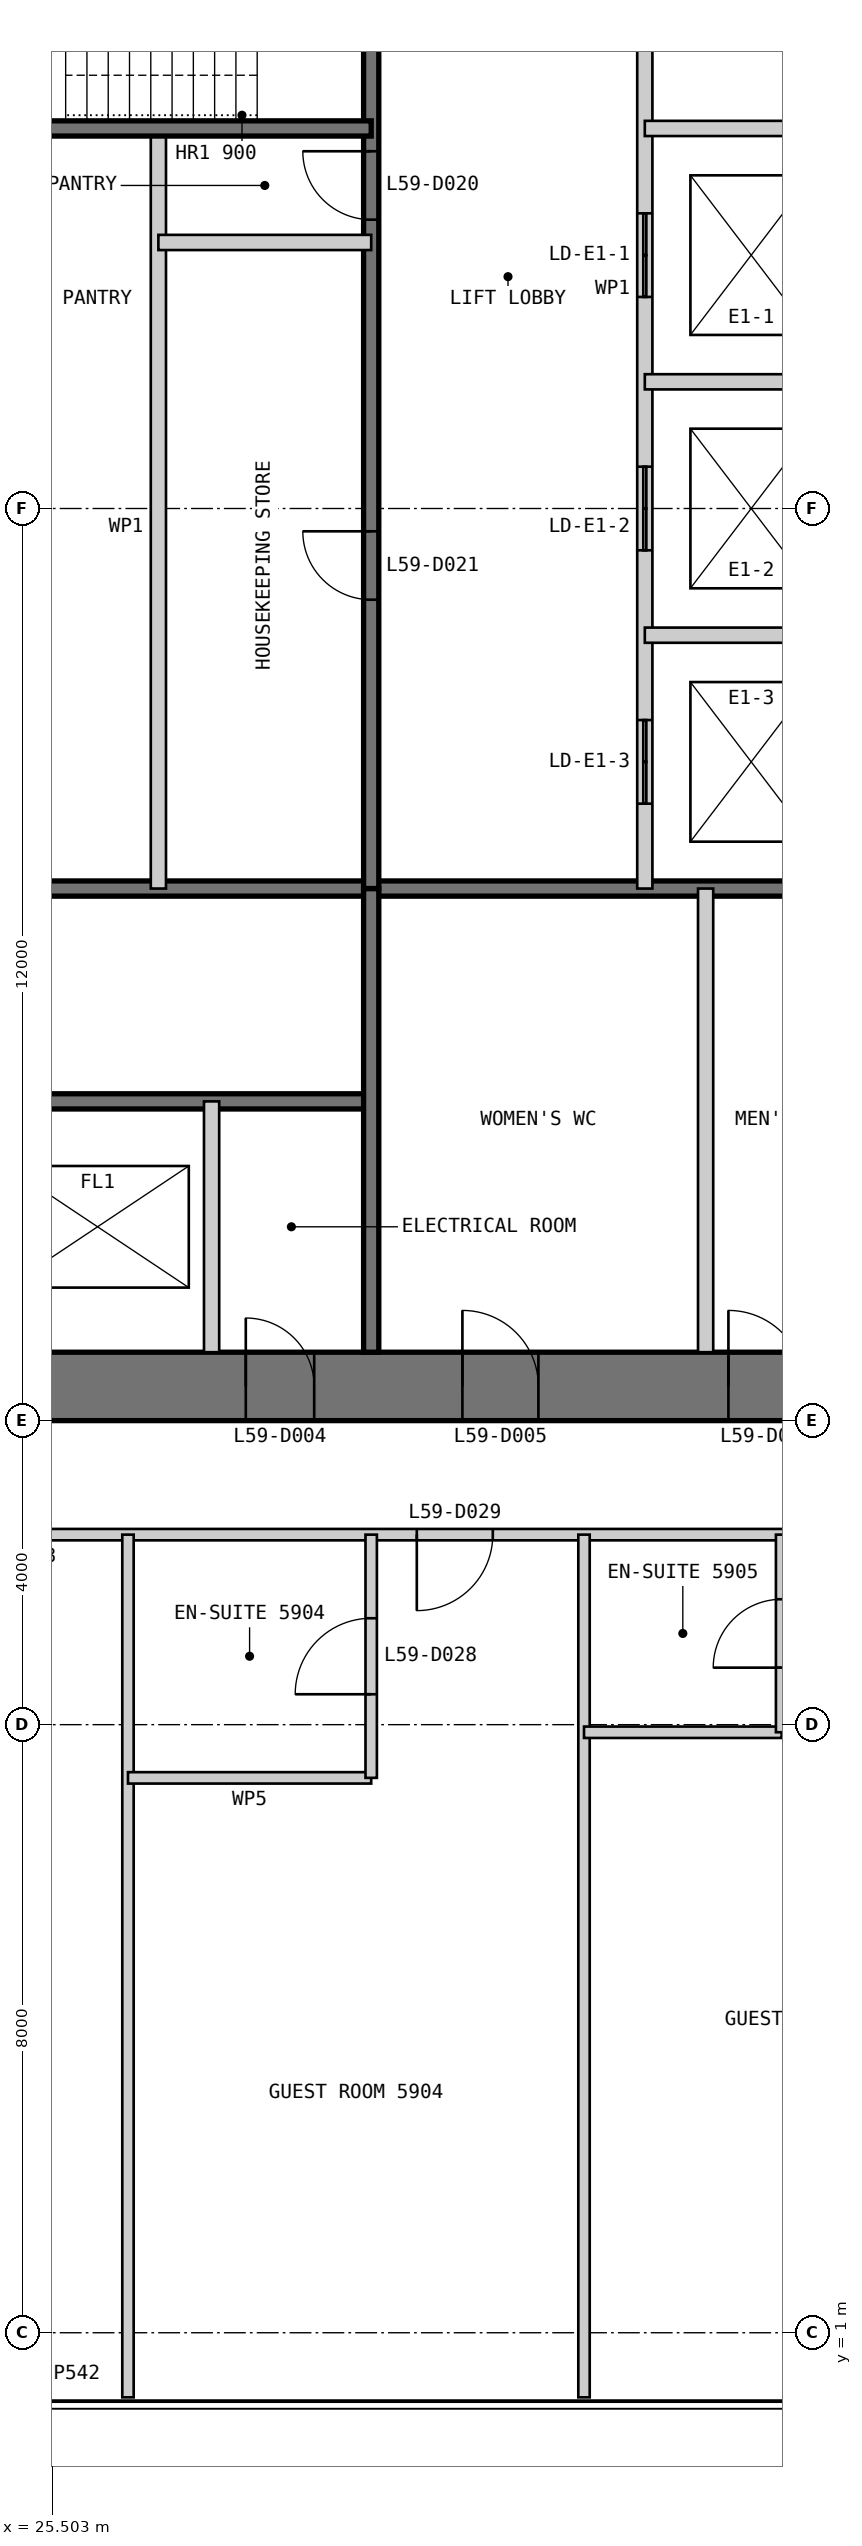
"""IFC4 building model, lengths in metres.
Left out: names, types, materials, properties, quantities, classifications, styles, units other than length and angle.
Written with IfcOpenShell. Run it as: python <this file> out.ifc"""

import sys

from ifc_helpers import new_model, si_unit, direction, frame, frame_2d, origin, place, context, subcontext, project, spatial, polyline, rectangle, outline, extrude, element, fill, save


model = new_model("IFC4")
c1 = context("Model", 3, precision=1e-05, world=origin(), true_north=direction((0.0, 1.0)))
c2 = subcontext(c1, "Body", "Model", "MODEL_VIEW")
j1 = project(units=[si_unit("LENGTHUNIT", "METRE"), si_unit("PLANEANGLEUNIT", "RADIAN")], contexts=[c1])
p1 = place(None, origin())
s1 = spatial("IfcSite", under=j1, at=p1, CompositionType="ELEMENT")
p2 = place(p1, origin())
s2 = spatial("IfcBuilding", under=s1, at=p2, CompositionType="ELEMENT")
p3 = place(p2, frame((0.0, 0.0, 252.6)))
s3 = spatial("IfcBuildingStorey", under=s2, at=p3, CompositionType="ELEMENT", Elevation=252.6)
p4 = place(p3, frame((13.0, 13.45, 0.0), z_axis=(0.0, 0.0, 1.0), x_axis=(1.0, 0.0, 0.0)))
e1 = element("IfcWall", 1, at=p4, inside=s3, PredefinedType="SHEAR", context=c2, shape_type="SweptSolid", body=[
    extrude(outline(polyline([(0.0, -0.45), (24.0, -0.45), (23.1, 0.45), (0.9, 0.45), (0.0, -0.45)])), origin(), (0.0, 0.0, 1.0), 3.4),
])
p5 = place(p4, frame((4.9, 0.0, 0.0)))
e2 = element("IfcOpeningElement", 2, at=p5, cuts=e1, PredefinedType="OPENING", context=c2, shape_type="SweptSolid", body=[
    extrude(rectangle(XDim=1.0, YDim=2.2, at=frame_2d((0.5, 1.1))), frame((0.0, 0.46, 0.0), z_axis=(0.0, -1.0, 0.0), x_axis=(1.0, 0.0, 0.0)), (0.0, 0.0, 1.0), 0.92),
])
p6 = place(p4, frame((8.9, 0.0, 0.0)))
e3 = element("IfcOpeningElement", 3, at=p6, cuts=e1, PredefinedType="OPENING", context=c2, shape_type="SweptSolid", body=[
    extrude(rectangle(XDim=1.1, YDim=2.2, at=frame_2d((0.55, 1.1))), frame((0.0, 0.46, 0.0), z_axis=(0.0, -1.0, 0.0), x_axis=(1.0, 0.0, 0.0)), (0.0, 0.0, 1.0), 0.92),
])
p7 = place(p4, frame((15.05, 0.0, 0.0)))
e4 = element("IfcOpeningElement", 4, at=p7, cuts=e1, PredefinedType="OPENING", context=c2, shape_type="SweptSolid", body=[
    extrude(rectangle(XDim=0.9, YDim=2.2, at=frame_2d((0.45, 1.1))), frame((0.0, 0.46, 0.0), z_axis=(0.0, -1.0, 0.0), x_axis=(1.0, 0.0, 0.0)), (0.0, 0.0, 1.0), 0.92),
])
p8 = place(p4, frame((17.9, 0.0, 0.0)))
e5 = element("IfcOpeningElement", 5, at=p8, cuts=e1, PredefinedType="OPENING", context=c2, shape_type="SweptSolid", body=[
    extrude(rectangle(XDim=1.0, YDim=2.2, at=frame_2d((0.5, 1.1))), frame((0.0, 0.46, 0.0), z_axis=(0.0, -1.0, 0.0), x_axis=(1.0, 0.0, 0.0)), (0.0, 0.0, 1.0), 0.92),
])
p9 = place(p4, frame((21.4, 0.0, 0.0)))
e6 = element("IfcOpeningElement", 6, at=p9, cuts=e1, PredefinedType="OPENING", context=c2, shape_type="SweptSolid", body=[
    extrude(rectangle(XDim=1.0, YDim=2.2, at=frame_2d((0.5, 1.1))), frame((0.0, 0.46, 0.0), z_axis=(0.0, -1.0, 0.0), x_axis=(1.0, 0.0, 0.0)), (0.0, 0.0, 1.0), 0.92),
])
p10 = place(p3, frame((20.3, 17.2, 0.0), z_axis=(0.0, 0.0, 1.0), x_axis=(1.0, 0.0, 0.0)))
e7 = element("IfcWall", 7, at=p10, inside=s3, PredefinedType="SOLIDWALL", context=c2, shape_type="SweptSolid", body=[
    extrude(rectangle(XDim=9.4, YDim=0.2, at=frame_2d((4.7, 0.0))), origin(), (0.0, 0.0, 1.0), 3.2),
])
p11 = place(p10, frame((0.25, 0.0, 0.0)))
e8 = element("IfcOpeningElement", 8, at=p11, cuts=e7, PredefinedType="OPENING", context=c2, shape_type="SweptSolid", body=[
    extrude(rectangle(XDim=1.0, YDim=2.2, at=frame_2d((0.5, 1.1))), frame((0.0, 0.11, 0.0), z_axis=(0.0, -1.0, 0.0), x_axis=(1.0, 0.0, 0.0)), (0.0, 0.0, 1.0), 0.22),
])
p12 = place(p3, frame((20.3, 20.0, 0.0), z_axis=(0.0, 0.0, 1.0), x_axis=(1.0, 0.0, 0.0)))
e9 = element("IfcWall", 9, at=p12, inside=s3, PredefinedType="SOLIDWALL", context=c2, shape_type="SweptSolid", body=[
    extrude(rectangle(XDim=15.8, YDim=0.2, at=frame_2d((7.9, 0.0))), origin(), (0.0, 0.0, 1.0), 3.2),
])
p13 = place(p3, frame((27.6, 13.9, 0.0), z_axis=(0.0, 0.0, 1.0), x_axis=(0.0, 1.0, 0.0)))
e10 = element("IfcWall", 10, at=p13, inside=s3, PredefinedType="PARTITIONING", context=c2, shape_type="SweptSolid", body=[
    extrude(rectangle(XDim=3.3, YDim=0.2, at=frame_2d((1.65, 0.0))), origin(), (0.0, 0.0, 1.0), 3.2),
])
p14 = place(p3, frame((29.7, 13.9, 0.0), z_axis=(0.0, 0.0, 1.0), x_axis=(0.0, 1.0, 0.0)))
e11 = element("IfcWall", 11, at=p14, inside=s3, PredefinedType="SOLIDWALL", context=c2, shape_type="SweptSolid", body=[
    extrude(rectangle(XDim=6.1, YDim=0.2, at=frame_2d((3.05, 0.0))), origin(), (0.0, 0.0, 1.0), 3.2),
])
p15 = place(p3, frame((34.1, 13.9, 0.0), z_axis=(0.0, 0.0, 1.0), x_axis=(0.0, 1.0, 0.0)))
e12 = element("IfcWall", 12, at=p15, inside=s3, PredefinedType="PARTITIONING", context=c2, shape_type="SweptSolid", body=[
    extrude(rectangle(XDim=6.1, YDim=0.2, at=frame_2d((3.05, 0.0))), origin(), (0.0, 0.0, 1.0), 3.2),
])
p16 = place(p3, frame((33.3, 36.1, 0.0), z_axis=(0.0, 0.0, 1.0), x_axis=(0.0, -1.0, 0.0)))
e13 = element("IfcWall", 13, at=p16, inside=s3, PredefinedType="PARTITIONING", context=c2, shape_type="SweptSolid", body=[
    extrude(rectangle(XDim=16.1, YDim=0.2, at=frame_2d((8.05, 0.0))), origin(), (0.0, 0.0, 1.0), 3.2),
])
p17 = place(p16, frame((7.217, 0.0, 0.0)))
e14 = element("IfcOpeningElement", 14, at=p17, cuts=e13, PredefinedType="OPENING", context=c2, shape_type="SweptSolid", body=[
    extrude(rectangle(XDim=1.1, YDim=2.2, at=frame_2d((0.55, 1.1))), frame((0.0, 0.11, 0.0), z_axis=(0.0, -1.0, 0.0), x_axis=(1.0, 0.0, 0.0)), (0.0, 0.0, 1.0), 0.22),
])
p18 = place(p16, frame((10.55, 0.0, 0.0)))
e15 = element("IfcOpeningElement", 15, at=p18, cuts=e13, PredefinedType="OPENING", context=c2, shape_type="SweptSolid", body=[
    extrude(rectangle(XDim=1.1, YDim=2.2, at=frame_2d((0.55, 1.1))), frame((0.0, 0.11, 0.0), z_axis=(0.0, -1.0, 0.0), x_axis=(1.0, 0.0, 0.0)), (0.0, 0.0, 1.0), 0.22),
])
p19 = place(p16, frame((13.883, 0.0, 0.0)))
e16 = element("IfcOpeningElement", 16, at=p19, cuts=e13, PredefinedType="OPENING", context=c2, shape_type="SweptSolid", body=[
    extrude(rectangle(XDim=1.1, YDim=2.2, at=frame_2d((0.55, 1.1))), frame((0.0, 0.11, 0.0), z_axis=(0.0, -1.0, 0.0), x_axis=(1.0, 0.0, 0.0)), (0.0, 0.0, 1.0), 0.22),
])
p20 = place(p3, frame((29.7, 36.1, 0.0), z_axis=(0.0, 0.0, 1.0), x_axis=(0.0, -1.0, 0.0)))
e17 = element("IfcWall", 17, at=p20, inside=s3, PredefinedType="SOLIDWALL", context=c2, shape_type="SweptSolid", body=[
    extrude(rectangle(XDim=16.1, YDim=0.2, at=frame_2d((8.05, 0.0))), origin(), (0.0, 0.0, 1.0), 3.2),
])
p21 = place(p20, frame((6.4, 0.0, 0.0)))
e18 = element("IfcOpeningElement", 18, at=p21, cuts=e17, PredefinedType="OPENING", context=c2, shape_type="SweptSolid", body=[
    extrude(rectangle(XDim=0.9, YDim=2.2, at=frame_2d((0.45, 1.1))), frame((0.0, 0.11, 0.0), z_axis=(0.0, -1.0, 0.0), x_axis=(1.0, 0.0, 0.0)), (0.0, 0.0, 1.0), 0.22),
])
p22 = place(p20, frame((11.4, 0.0, 0.0)))
e19 = element("IfcOpeningElement", 19, at=p22, cuts=e17, PredefinedType="OPENING", context=c2, shape_type="SweptSolid", body=[
    extrude(rectangle(XDim=0.9, YDim=2.2, at=frame_2d((0.45, 1.1))), frame((0.0, 0.11, 0.0), z_axis=(0.0, -1.0, 0.0), x_axis=(1.0, 0.0, 0.0)), (0.0, 0.0, 1.0), 0.22),
])
for number, where, z_axis, x_axis in (
    (20, (36.1, 30.0, 0.0), (0.0, 0.0, 1.0), (-1.0, 0.0, 0.0)),
    (21, (36.1, 26.667, 0.0), (0.0, 0.0, 1.0), (-1.0, 0.0, 0.0)),
    (22, (36.1, 23.333, 0.0), (0.0, 0.0, 1.0), (-1.0, 0.0, 0.0)),
):
    element("IfcWall", number, at=place(p3, frame(where, z_axis=z_axis, x_axis=x_axis)), inside=s3, PredefinedType="PARTITIONING", context=c2, shape_type="SweptSolid", body=[
        extrude(rectangle(XDim=2.8, YDim=0.2, at=frame_2d((1.4, 0.0))), origin(), (0.0, 0.0, 1.0), 3.2),
    ])
p23 = place(p3, frame((26.9, 30.0, 0.0), z_axis=(0.0, 0.0, 1.0), x_axis=(0.0, -1.0, 0.0)))
e23 = element("IfcWall", 23, at=p23, inside=s3, PredefinedType="PARTITIONING", context=c2, shape_type="SweptSolid", body=[
    extrude(rectangle(XDim=10.0, YDim=0.2, at=frame_2d((5.0, 0.0))), origin(), (0.0, 0.0, 1.0), 3.2),
])
p24 = place(p3, frame((29.7, 30.0, 0.0), z_axis=(0.0, 0.0, 1.0), x_axis=(-1.0, 0.0, 0.0)))
e24 = element("IfcWall", 24, at=p24, inside=s3, PredefinedType="SOLIDWALL", context=c2, shape_type="SweptSolid", body=[
    extrude(rectangle(XDim=15.8, YDim=0.2, at=frame_2d((7.9, 0.0))), origin(), (0.0, 0.0, 1.0), 3.2),
])
p25 = place(p3, frame((29.7, 28.5, 0.0), z_axis=(0.0, 0.0, 1.0), x_axis=(-1.0, 0.0, 0.0)))
e25 = element("IfcWall", 25, at=p25, inside=s3, PredefinedType="PARTITIONING", context=c2, shape_type="SweptSolid", body=[
    extrude(rectangle(XDim=2.8, YDim=0.2, at=frame_2d((1.4, 0.0))), origin(), (0.0, 0.0, 1.0), 3.2),
])
p26 = place(p3, frame((11.5, 11.5, 0.0), z_axis=(0.0, 0.0, 1.0), x_axis=(1.0, 0.0, 0.0)))
e26 = element("IfcWall", 26, at=p26, inside=s3, PredefinedType="PARTITIONING", context=c2, shape_type="SweptSolid", body=[
    extrude(rectangle(XDim=27.0, YDim=0.15, at=frame_2d((13.5, 0.0))), origin(), (0.0, 0.0, 1.0), 3.25),
])
p27 = place(p26, frame((1.85, 0.0, 0.0)))
e27 = element("IfcOpeningElement", 27, at=p27, cuts=e26, PredefinedType="OPENING", context=c2, shape_type="SweptSolid", body=[
    extrude(rectangle(XDim=0.9, YDim=2.1, at=frame_2d((0.45, 1.05))), frame((0.0, 0.085, 0.0), z_axis=(0.0, -1.0, 0.0), x_axis=(1.0, 0.0, 0.0)), (0.0, 0.0, 1.0), 0.17),
])
p28 = place(p26, frame((6.2, 0.0, 0.0)))
e28 = element("IfcOpeningElement", 28, at=p28, cuts=e26, PredefinedType="OPENING", context=c2, shape_type="SweptSolid", body=[
    extrude(rectangle(XDim=0.9, YDim=2.1, at=frame_2d((0.45, 1.05))), frame((0.0, 0.085, 0.0), z_axis=(0.0, -1.0, 0.0), x_axis=(1.0, 0.0, 0.0)), (0.0, 0.0, 1.0), 0.17),
])
p29 = place(p26, frame((12.2, 0.0, 0.0)))
e29 = element("IfcOpeningElement", 29, at=p29, cuts=e26, PredefinedType="OPENING", context=c2, shape_type="SweptSolid", body=[
    extrude(rectangle(XDim=0.9, YDim=2.1, at=frame_2d((0.45, 1.05))), frame((0.0, 0.085, 0.0), z_axis=(0.0, -1.0, 0.0), x_axis=(1.0, 0.0, 0.0)), (0.0, 0.0, 1.0), 0.17),
])
p30 = place(p26, frame((18.8, 0.0, 0.0)))
e30 = element("IfcOpeningElement", 30, at=p30, cuts=e26, PredefinedType="OPENING", context=c2, shape_type="SweptSolid", body=[
    extrude(rectangle(XDim=1.0, YDim=2.1, at=frame_2d((0.5, 1.05))), frame((0.0, 0.085, 0.0), z_axis=(0.0, -1.0, 0.0), x_axis=(1.0, 0.0, 0.0)), (0.0, 0.0, 1.0), 0.17),
])
p31 = place(p26, frame((24.2, 0.0, 0.0)))
e31 = element("IfcOpeningElement", 31, at=p31, cuts=e26, PredefinedType="OPENING", context=c2, shape_type="SweptSolid", body=[
    extrude(rectangle(XDim=0.9, YDim=2.1, at=frame_2d((0.45, 1.05))), frame((0.0, 0.085, 0.0), z_axis=(0.0, -1.0, 0.0), x_axis=(1.0, 0.0, 0.0)), (0.0, 0.0, 1.0), 0.17),
])
p32 = place(p3, frame((26.5, 0.15, 0.0), z_axis=(0.0, 0.0, 1.0), x_axis=(0.0, 1.0, 0.0)))
e32 = element("IfcWall", 32, at=p32, inside=s3, PredefinedType="PARTITIONING", context=c2, shape_type="SweptSolid", body=[
    extrude(rectangle(XDim=11.35, YDim=0.15, at=frame_2d((5.675, 0.0))), origin(), (0.0, 0.0, 1.0), 3.25),
])
p33 = place(p3, frame((26.5, 8.3, 0.0), z_axis=(0.0, 0.0, 1.0), x_axis=(1.0, 0.0, 0.0)))
e33 = element("IfcWall", 33, at=p33, inside=s3, PredefinedType="PARTITIONING", context=c2, shape_type="SweptSolid", body=[
    extrude(rectangle(XDim=3.2, YDim=0.15, at=frame_2d((1.6, 0.0))), origin(), (0.0, 0.0, 1.0), 3.25),
])
p34 = place(p3, frame((29.7, 8.3, 0.0), z_axis=(0.0, 0.0, 1.0), x_axis=(0.0, 1.0, 0.0)))
e34 = element("IfcWall", 34, at=p34, inside=s3, PredefinedType="PARTITIONING", context=c2, shape_type="SweptSolid", body=[
    extrude(rectangle(XDim=3.2, YDim=0.15, at=frame_2d((1.6, 0.0))), origin(), (0.0, 0.0, 1.0), 3.25),
])
p35 = place(p34, frame((1.1, 0.0, 0.0)))
e35 = element("IfcOpeningElement", 35, at=p35, cuts=e34, PredefinedType="OPENING", context=c2, shape_type="SweptSolid", body=[
    extrude(rectangle(XDim=1.0, YDim=2.1, at=frame_2d((0.5, 1.05))), frame((0.0, 0.085, 0.0), z_axis=(0.0, -1.0, 0.0), x_axis=(1.0, 0.0, 0.0)), (0.0, 0.0, 1.0), 0.17),
])
p36 = place(p3, frame((32.5, 0.15, 0.0), z_axis=(0.0, 0.0, 1.0), x_axis=(0.0, 1.0, 0.0)))
e36 = element("IfcWall", 36, at=p36, inside=s3, PredefinedType="PARTITIONING", context=c2, shape_type="SweptSolid", body=[
    extrude(rectangle(XDim=11.35, YDim=0.15, at=frame_2d((5.675, 0.0))), origin(), (0.0, 0.0, 1.0), 3.25),
])
p37 = place(p3, frame((32.5, 8.9, 0.0), z_axis=(0.0, 0.0, 1.0), x_axis=(1.0, 0.0, 0.0)))
e37 = element("IfcWall", 37, at=p37, inside=s3, PredefinedType="PARTITIONING", context=c2, shape_type="SweptSolid", body=[
    extrude(rectangle(XDim=2.6, YDim=0.15, at=frame_2d((1.3, 0.0))), origin(), (0.0, 0.0, 1.0), 3.25),
])
p38 = place(p3, frame((35.1, 8.9, 0.0), z_axis=(0.0, 0.0, 1.0), x_axis=(0.0, 1.0, 0.0)))
e38 = element("IfcWall", 38, at=p38, inside=s3, PredefinedType="PARTITIONING", context=c2, shape_type="SweptSolid", body=[
    extrude(rectangle(XDim=2.6, YDim=0.15, at=frame_2d((1.3, 0.0))), origin(), (0.0, 0.0, 1.0), 3.25),
])
p39 = place(p38, frame((0.85, 0.0, 0.0)))
e39 = element("IfcOpeningElement", 39, at=p39, cuts=e38, PredefinedType="OPENING", context=c2, shape_type="SweptSolid", body=[
    extrude(rectangle(XDim=0.9, YDim=2.1, at=frame_2d((0.45, 1.05))), frame((0.0, 0.085, 0.0), z_axis=(0.0, -1.0, 0.0), x_axis=(1.0, 0.0, 0.0)), (0.0, 0.0, 1.0), 0.17),
])
p40 = place(p7, origin())
e40 = element("IfcDoor", 40, at=p40, inside=s3, OperationType="SINGLE_SWING_LEFT", PredefinedType="DOOR", context=c2, shape_type="SweptSolid", body=[
    extrude(rectangle(XDim=0.9, YDim=2.2, at=frame_2d((0.45, 1.1))), frame((0.0, 0.025, 0.0), z_axis=(0.0, -1.0, 0.0), x_axis=(1.0, 0.0, 0.0)), (0.0, 0.0, 1.0), 0.05),
    extrude(outline(polyline([(0.0, 0.0), (0.04, 0.0), (0.04, 2.16), (0.86, 2.16), (0.86, 0.0), (0.9, 0.0), (0.9, 2.2), (0.0, 2.2), (0.0, 0.0)])), frame((0.0, 0.3, 0.0), z_axis=(0.0, -1.0, 0.0), x_axis=(1.0, 0.0, 0.0)), (0.0, 0.0, 1.0), 0.6),
])
fill(e4, e40)
p41 = place(p8, origin())
e41 = element("IfcDoor", 41, at=p41, inside=s3, OperationType="SINGLE_SWING_LEFT", PredefinedType="DOOR", context=c2, shape_type="SweptSolid", body=[
    extrude(rectangle(XDim=1.0, YDim=2.2, at=frame_2d((0.5, 1.1))), frame((0.0, 0.025, 0.0), z_axis=(0.0, -1.0, 0.0), x_axis=(1.0, 0.0, 0.0)), (0.0, 0.0, 1.0), 0.05),
    extrude(outline(polyline([(0.0, 0.0), (0.04, 0.0), (0.04, 2.16), (0.96, 2.16), (0.96, 0.0), (1.0, 0.0), (1.0, 2.2), (0.0, 2.2), (0.0, 0.0)])), frame((0.0, 0.3, 0.0), z_axis=(0.0, -1.0, 0.0), x_axis=(1.0, 0.0, 0.0)), (0.0, 0.0, 1.0), 0.6),
])
fill(e5, e41)
p42 = place(p9, origin())
e42 = element("IfcDoor", 42, at=p42, inside=s3, OperationType="SINGLE_SWING_LEFT", PredefinedType="DOOR", context=c2, shape_type="SweptSolid", body=[
    extrude(rectangle(XDim=1.0, YDim=2.2, at=frame_2d((0.5, 1.1))), frame((0.0, 0.025, 0.0), z_axis=(0.0, -1.0, 0.0), x_axis=(1.0, 0.0, 0.0)), (0.0, 0.0, 1.0), 0.05),
    extrude(outline(polyline([(0.0, 0.0), (0.04, 0.0), (0.04, 2.16), (0.96, 2.16), (0.96, 0.0), (1.0, 0.0), (1.0, 2.2), (0.0, 2.2), (0.0, 0.0)])), frame((0.0, 0.3, 0.0), z_axis=(0.0, -1.0, 0.0), x_axis=(1.0, 0.0, 0.0)), (0.0, 0.0, 1.0), 0.6),
])
fill(e6, e42)
p43 = place(p21, frame((0.9, 0.0, 0.0), z_axis=(0.0, 0.0, 1.0), x_axis=(-1.0, 0.0, 0.0)))
e43 = element("IfcDoor", 43, at=p43, inside=s3, OperationType="SINGLE_SWING_RIGHT", PredefinedType="DOOR", context=c2, shape_type="SweptSolid", body=[
    extrude(rectangle(XDim=0.9, YDim=2.2, at=frame_2d((0.45, 1.1))), frame((0.0, 0.025, 0.0), z_axis=(0.0, -1.0, 0.0), x_axis=(1.0, 0.0, 0.0)), (0.0, 0.0, 1.0), 0.05),
])
fill(e18, e43)
p44 = place(p22, frame((0.9, 0.0, 0.0), z_axis=(0.0, 0.0, 1.0), x_axis=(-1.0, 0.0, 0.0)))
e44 = element("IfcDoor", 44, at=p44, inside=s3, OperationType="SINGLE_SWING_RIGHT", PredefinedType="DOOR", context=c2, shape_type="SweptSolid", body=[
    extrude(rectangle(XDim=0.9, YDim=2.2, at=frame_2d((0.45, 1.1))), frame((0.0, 0.025, 0.0), z_axis=(0.0, -1.0, 0.0), x_axis=(1.0, 0.0, 0.0)), (0.0, 0.0, 1.0), 0.05),
])
fill(e19, e44)
p45 = place(p35, origin())
e45 = element("IfcDoor", 45, at=p45, inside=s3, OperationType="SINGLE_SWING_LEFT", PredefinedType="DOOR", context=c2, shape_type="SweptSolid", body=[
    extrude(rectangle(XDim=1.0, YDim=2.1, at=frame_2d((0.5, 1.05))), frame((0.0, 0.025, 0.0), z_axis=(0.0, -1.0, 0.0), x_axis=(1.0, 0.0, 0.0)), (0.0, 0.0, 1.0), 0.05),
])
fill(e35, e45)
p46 = place(p30, frame((1.0, 0.0, 0.0), z_axis=(0.0, 0.0, 1.0), x_axis=(-1.0, 0.0, 0.0)))
e46 = element("IfcDoor", 46, at=p46, inside=s3, OperationType="SINGLE_SWING_RIGHT", PredefinedType="DOOR", context=c2, shape_type="SweptSolid", body=[
    extrude(rectangle(XDim=1.0, YDim=2.1, at=frame_2d((0.5, 1.05))), frame((0.0, 0.025, 0.0), z_axis=(0.0, -1.0, 0.0), x_axis=(1.0, 0.0, 0.0)), (0.0, 0.0, 1.0), 0.05),
])
fill(e30, e46)
p47 = place(p39, origin())
e47 = element("IfcDoor", 47, at=p47, inside=s3, OperationType="SINGLE_SWING_LEFT", PredefinedType="DOOR", context=c2, shape_type="SweptSolid", body=[
    extrude(rectangle(XDim=0.9, YDim=2.1, at=frame_2d((0.45, 1.05))), frame((0.0, 0.025, 0.0), z_axis=(0.0, -1.0, 0.0), x_axis=(1.0, 0.0, 0.0)), (0.0, 0.0, 1.0), 0.05),
])
fill(e39, e47)
p48 = place(p17, origin())
e48 = element("IfcDoor", 48, at=p48, inside=s3, OperationType="DOUBLE_DOOR_SLIDING", PredefinedType="DOOR", context=c2, shape_type="SweptSolid", body=[
    extrude(rectangle(XDim=1.1, YDim=2.2, at=frame_2d((0.55, 1.1))), frame((0.0, 0.025, 0.0), z_axis=(0.0, -1.0, 0.0), x_axis=(1.0, 0.0, 0.0)), (0.0, 0.0, 1.0), 0.05),
])
fill(e14, e48)
p49 = place(p18, origin())
e49 = element("IfcDoor", 49, at=p49, inside=s3, OperationType="DOUBLE_DOOR_SLIDING", PredefinedType="DOOR", context=c2, shape_type="SweptSolid", body=[
    extrude(rectangle(XDim=1.1, YDim=2.2, at=frame_2d((0.55, 1.1))), frame((0.0, 0.025, 0.0), z_axis=(0.0, -1.0, 0.0), x_axis=(1.0, 0.0, 0.0)), (0.0, 0.0, 1.0), 0.05),
])
fill(e15, e49)
p50 = place(p19, origin())
e50 = element("IfcDoor", 50, at=p50, inside=s3, OperationType="DOUBLE_DOOR_SLIDING", PredefinedType="DOOR", context=c2, shape_type="SweptSolid", body=[
    extrude(rectangle(XDim=1.1, YDim=2.2, at=frame_2d((0.55, 1.1))), frame((0.0, 0.025, 0.0), z_axis=(0.0, -1.0, 0.0), x_axis=(1.0, 0.0, 0.0)), (0.0, 0.0, 1.0), 0.05),
])
fill(e16, e50)
save(model, sys.argv[1])
